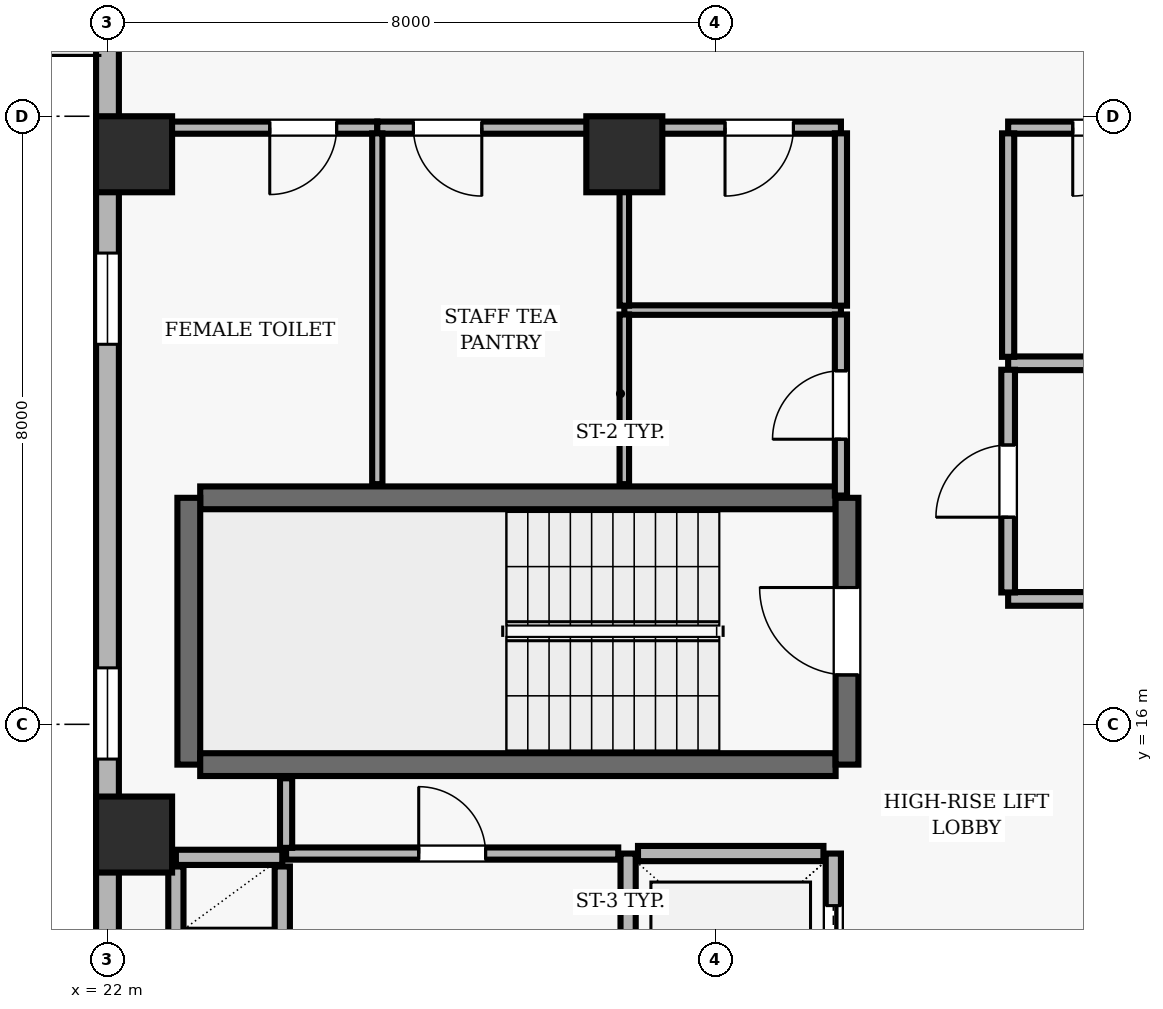
"""IFC4 building model, lengths in metres.
Left out: names, types, materials, properties, quantities, classifications, styles, units other than length and angle.
Written with IfcOpenShell. Run it as: python <this file> out.ifc"""

import sys

from ifc_helpers import new_model, si_unit, direction, frame, frame_2d, origin, origin_2d, place, context, subcontext, project, spatial, rectangle, extrude, element, fill, save


model = new_model("IFC4")
c1 = context("Model", 3, precision=1e-05, world=origin(), true_north=direction((0.0, 1.0)))
c2 = subcontext(c1, "Body", "Model", "MODEL_VIEW")
j1 = project(units=[si_unit("LENGTHUNIT", "METRE"), si_unit("PLANEANGLEUNIT", "RADIAN")], contexts=[c1])
p1 = place(None, origin())
s1 = spatial("IfcSite", under=j1, at=p1, CompositionType="ELEMENT")
p2 = place(p1, origin())
s2 = spatial("IfcBuilding", under=s1, at=p2, CompositionType="ELEMENT")
p3 = place(p2, frame((0.0, 0.0, 199.2)))
s3 = spatial("IfcBuildingStorey", under=s2, at=p3, CompositionType="ELEMENT", Elevation=199.2)
for number, where, z_axis, x_axis in (
    (1, (22.35, 14.55, 0.0), (0.0, 0.0, 1.0), (1.0, 0.0, 0.0)),
    (2, (22.35, 23.5, 0.0), (0.0, 0.0, 1.0), (1.0, 0.0, 0.0)),
    (3, (28.8, 23.5, 0.0), (0.0, 0.0, 1.0), (1.0, 0.0, 0.0)),
):
    element("IfcColumn", number, at=place(p3, frame(where, z_axis=z_axis, x_axis=x_axis)), inside=s3, PredefinedType="COLUMN", context=c2, shape_type="SweptSolid", body=[
        extrude(rectangle(XDim=1.0, YDim=1.0, at=origin_2d()), origin(), (0.0, 0.0, 1.0), 3.9),
    ])
p4 = place(p3, frame((22.0, 40.7, 0.0), z_axis=(0.0, 0.0, 1.0), x_axis=(0.0, -1.0, 0.0)))
e4 = element("IfcWall", 4, at=p4, inside=s3, PredefinedType="SOLIDWALL", context=c2, shape_type="SweptSolid", body=[
    extrude(rectangle(XDim=38.2, YDim=0.3, at=frame_2d((19.1, 0.0))), origin(), (0.0, 0.0, 1.0), 3.69),
])
p5 = place(p4, frame((7.8, 0.0, 0.0)))
e5 = element("IfcOpeningElement", 5, at=p5, cuts=e4, PredefinedType="OPENING", context=c2, shape_type="SweptSolid", body=[
    extrude(rectangle(XDim=1.0, YDim=2.2, at=frame_2d((0.5, 1.1))), frame((0.0, 0.16, 0.0), z_axis=(0.0, -1.0, 0.0), x_axis=(1.0, 0.0, 0.0)), (0.0, 0.0, 1.0), 0.32),
])
p6 = place(p4, frame((2.129, 0.0, 0.9)))
e6 = element("IfcOpeningElement", 6, at=p6, cuts=e4, PredefinedType="OPENING", context=c2, shape_type="SweptSolid", body=[
    extrude(rectangle(XDim=1.2, YDim=1.6, at=frame_2d((0.6, 0.8))), frame((0.0, 0.16, 0.0), z_axis=(0.0, -1.0, 0.0), x_axis=(1.0, 0.0, 0.0)), (0.0, 0.0, 1.0), 0.32),
])
p7 = place(p4, frame((12.593, 0.0, 0.9)))
e7 = element("IfcOpeningElement", 7, at=p7, cuts=e4, PredefinedType="OPENING", context=c2, shape_type="SweptSolid", body=[
    extrude(rectangle(XDim=1.2, YDim=1.6, at=frame_2d((0.6, 0.8))), frame((0.0, 0.16, 0.0), z_axis=(0.0, -1.0, 0.0), x_axis=(1.0, 0.0, 0.0)), (0.0, 0.0, 1.0), 0.32),
])
p8 = place(p4, frame((18.5, 0.0, 0.9)))
e8 = element("IfcOpeningElement", 8, at=p8, cuts=e4, PredefinedType="OPENING", context=c2, shape_type="SweptSolid", body=[
    extrude(rectangle(XDim=1.2, YDim=1.6, at=frame_2d((0.6, 0.8))), frame((0.0, 0.16, 0.0), z_axis=(0.0, -1.0, 0.0), x_axis=(1.0, 0.0, 0.0)), (0.0, 0.0, 1.0), 0.32),
])
p9 = place(p4, frame((23.957, 0.0, 0.9)))
e9 = element("IfcOpeningElement", 9, at=p9, cuts=e4, PredefinedType="OPENING", context=c2, shape_type="SweptSolid", body=[
    extrude(rectangle(XDim=1.2, YDim=1.6, at=frame_2d((0.6, 0.8))), frame((0.0, 0.16, 0.0), z_axis=(0.0, -1.0, 0.0), x_axis=(1.0, 0.0, 0.0)), (0.0, 0.0, 1.0), 0.32),
])
p10 = place(p4, frame((29.414, 0.0, 0.9)))
e10 = element("IfcOpeningElement", 10, at=p10, cuts=e4, PredefinedType="OPENING", context=c2, shape_type="SweptSolid", body=[
    extrude(rectangle(XDim=1.2, YDim=1.6, at=frame_2d((0.6, 0.8))), frame((0.0, 0.16, 0.0), z_axis=(0.0, -1.0, 0.0), x_axis=(1.0, 0.0, 0.0)), (0.0, 0.0, 1.0), 0.32),
])
p11 = place(p3, frame((31.58, 18.98, 0.0), z_axis=(0.0, 0.0, 1.0), x_axis=(-1.0, 0.0, 0.0)))
e11 = element("IfcWall", 11, at=p11, inside=s3, PredefinedType="SHEAR", context=c2, shape_type="SweptSolid", body=[
    extrude(rectangle(XDim=8.36, YDim=0.3, at=frame_2d((4.18, 0.0))), origin(), (0.0, 0.0, 1.0), 3.69),
])
p12 = place(p3, frame((23.07, 18.98, 0.0), z_axis=(0.0, 0.0, 1.0), x_axis=(0.0, -1.0, 0.0)))
e12 = element("IfcWall", 12, at=p12, inside=s3, PredefinedType="SHEAR", context=c2, shape_type="SweptSolid", body=[
    extrude(rectangle(XDim=3.51, YDim=0.3, at=frame_2d((1.755, 0.0))), origin(), (0.0, 0.0, 1.0), 3.69),
])
p13 = place(p3, frame((23.22, 15.47, 0.0), z_axis=(0.0, 0.0, 1.0), x_axis=(1.0, 0.0, 0.0)))
e13 = element("IfcWall", 13, at=p13, inside=s3, PredefinedType="SHEAR", context=c2, shape_type="SweptSolid", body=[
    extrude(rectangle(XDim=8.36, YDim=0.3, at=frame_2d((4.18, 0.0))), origin(), (0.0, 0.0, 1.0), 3.69),
])
p14 = place(p3, frame((31.73, 15.47, 0.0), z_axis=(0.0, 0.0, 1.0), x_axis=(0.0, 1.0, 0.0)))
e14 = element("IfcWall", 14, at=p14, inside=s3, PredefinedType="SHEAR", context=c2, shape_type="SweptSolid", body=[
    extrude(rectangle(XDim=3.51, YDim=0.3, at=frame_2d((1.755, 0.0))), origin(), (0.0, 0.0, 1.0), 3.69),
])
p15 = place(p14, frame((1.18, 0.0, 0.0)))
e15 = element("IfcOpeningElement", 15, at=p15, cuts=e14, PredefinedType="OPENING", context=c2, shape_type="SweptSolid", body=[
    extrude(rectangle(XDim=1.15, YDim=2.15, at=frame_2d((0.575, 1.075))), frame((0.0, 0.16, 0.0), z_axis=(0.0, -1.0, 0.0), x_axis=(1.0, 0.0, 0.0)), (0.0, 0.0, 1.0), 0.32),
])
p16 = place(p3, frame((28.85, 14.3, 0.0), z_axis=(0.0, 0.0, 1.0), x_axis=(0.0, -1.0, 0.0)))
e16 = element("IfcWall", 16, at=p16, inside=s3, PredefinedType="SOLIDWALL", context=c2, shape_type="SweptSolid", body=[
    extrude(rectangle(XDim=2.37, YDim=0.2, at=frame_2d((1.185, 0.0))), origin(), (0.0, 0.0, 1.0), 3.69),
])
p17 = place(p3, frame((31.55, 11.93, 0.0), z_axis=(0.0, 0.0, 1.0), x_axis=(0.0, 1.0, 0.0)))
e17 = element("IfcWall", 17, at=p17, inside=s3, PredefinedType="SOLIDWALL", context=c2, shape_type="SweptSolid", body=[
    extrude(rectangle(XDim=2.37, YDim=0.2, at=frame_2d((1.185, 0.0))), origin(), (0.0, 0.0, 1.0), 3.69),
])
p18 = place(p17, frame((0.685, 0.0, 0.0)))
e18 = element("IfcOpeningElement", 18, at=p18, cuts=e17, PredefinedType="OPENING", context=c2, shape_type="SweptSolid", body=[
    extrude(rectangle(XDim=1.0, YDim=2.1, at=frame_2d((0.5, 1.05))), frame((0.0, 0.11, 0.0), z_axis=(0.0, -1.0, 0.0), x_axis=(1.0, 0.0, 0.0)), (0.0, 0.0, 1.0), 0.22),
])
p19 = place(p3, frame((31.42, 14.3, 0.0), z_axis=(0.0, 0.0, 1.0), x_axis=(-1.0, 0.0, 0.0)))
e19 = element("IfcWall", 19, at=p19, inside=s3, PredefinedType="SOLIDWALL", context=c2, shape_type="SweptSolid", body=[
    extrude(rectangle(XDim=2.44, YDim=0.2, at=frame_2d((1.22, 0.0))), origin(), (0.0, 0.0, 1.0), 3.69),
])
p20 = place(p3, frame((22.9, 14.25, 0.0), z_axis=(0.0, 0.0, 1.0), x_axis=(1.0, 0.0, 0.0)))
e20 = element("IfcWall", 20, at=p20, inside=s3, PredefinedType="SOLIDWALL", context=c2, shape_type="SweptSolid", body=[
    extrude(rectangle(XDim=1.4, YDim=0.2, at=frame_2d((0.7, 0.0))), origin(), (0.0, 0.0, 1.0), 3.69),
])
for number, where, z_axis, x_axis in (
    (21, (24.3, 12.3, 0.0), (0.0, 0.0, 1.0), (0.0, 1.0, 0.0)),
    (22, (22.9, 12.3, 0.0), (0.0, 0.0, 1.0), (0.0, 1.0, 0.0)),
):
    element("IfcWall", number, at=place(p3, frame(where, z_axis=z_axis, x_axis=x_axis)), inside=s3, PredefinedType="SOLIDWALL", context=c2, shape_type="SweptSolid", body=[
        extrude(rectangle(XDim=1.83, YDim=0.2, at=frame_2d((0.915, 0.0))), origin(), (0.0, 0.0, 1.0), 3.69),
    ])
p21 = place(p3, frame((24.35, 14.3, 0.0), z_axis=(0.0, 0.0, 1.0), x_axis=(1.0, 0.0, 0.0)))
e23 = element("IfcWall", 23, at=p21, inside=s3, PredefinedType="PARTITIONING", context=c2, shape_type="SweptSolid", body=[
    extrude(rectangle(XDim=4.37, YDim=0.16, at=frame_2d((2.185, 0.0))), origin(), (0.0, 0.0, 1.0), 3.69),
])
p22 = place(p21, frame((1.745, 0.0, 0.0)))
e24 = element("IfcOpeningElement", 24, at=p22, cuts=e23, PredefinedType="OPENING", context=c2, shape_type="SweptSolid", body=[
    extrude(rectangle(XDim=0.88, YDim=2.1, at=frame_2d((0.44, 1.05))), frame((0.0, 0.09, 0.0), z_axis=(0.0, -1.0, 0.0), x_axis=(1.0, 0.0, 0.0)), (0.0, 0.0, 1.0), 0.18),
])
p23 = place(p3, frame((25.55, 23.85, 0.0), z_axis=(0.0, 0.0, 1.0), x_axis=(-1.0, 0.0, 0.0)))
e25 = element("IfcWall", 25, at=p23, inside=s3, PredefinedType="PARTITIONING", context=c2, shape_type="SweptSolid", body=[
    extrude(rectangle(XDim=3.35, YDim=0.16, at=frame_2d((1.675, 0.0))), origin(), (0.0, 0.0, 1.0), 3.139),
])
p24 = place(p23, frame((0.535, 0.0, 0.0)))
e26 = element("IfcOpeningElement", 26, at=p24, cuts=e25, PredefinedType="OPENING", context=c2, shape_type="SweptSolid", body=[
    extrude(rectangle(XDim=0.88, YDim=2.1, at=frame_2d((0.44, 1.05))), frame((0.0, 0.09, 0.0), z_axis=(0.0, -1.0, 0.0), x_axis=(1.0, 0.0, 0.0)), (0.0, 0.0, 1.0), 0.18),
])
p25 = place(p3, frame((28.8, 23.85, 0.0), z_axis=(0.0, 0.0, 1.0), x_axis=(-1.0, 0.0, 0.0)))
e27 = element("IfcWall", 27, at=p25, inside=s3, PredefinedType="PARTITIONING", context=c2, shape_type="SweptSolid", body=[
    extrude(rectangle(XDim=3.25, YDim=0.16, at=frame_2d((1.625, 0.0))), origin(), (0.0, 0.0, 1.0), 3.139),
])
p26 = place(p25, frame((1.875, 0.0, 0.0)))
e28 = element("IfcOpeningElement", 28, at=p26, cuts=e27, PredefinedType="OPENING", context=c2, shape_type="SweptSolid", body=[
    extrude(rectangle(XDim=0.9, YDim=2.1, at=frame_2d((0.45, 1.05))), frame((0.0, 0.09, 0.0), z_axis=(0.0, -1.0, 0.0), x_axis=(1.0, 0.0, 0.0)), (0.0, 0.0, 1.0), 0.18),
])
p27 = place(p3, frame((31.65, 21.45, 0.0), z_axis=(0.0, 0.0, 1.0), x_axis=(-1.0, 0.0, 0.0)))
e29 = element("IfcWall", 29, at=p27, inside=s3, PredefinedType="PARTITIONING", context=c2, shape_type="SweptSolid", body=[
    extrude(rectangle(XDim=2.85, YDim=0.125, at=frame_2d((1.425, 0.0))), origin(), (0.0, 0.0, 1.0), 3.69),
])
p28 = place(p3, frame((31.65, 23.85, 0.0), z_axis=(0.0, 0.0, 1.0), x_axis=(-1.0, 0.0, 0.0)))
e30 = element("IfcWall", 30, at=p28, inside=s3, PredefinedType="PARTITIONING", context=c2, shape_type="SweptSolid", body=[
    extrude(rectangle(XDim=2.85, YDim=0.16, at=frame_2d((1.425, 0.0))), origin(), (0.0, 0.0, 1.0), 3.139),
])
p29 = place(p28, frame((0.625, 0.0, 0.0)))
e31 = element("IfcOpeningElement", 31, at=p29, cuts=e30, PredefinedType="OPENING", context=c2, shape_type="SweptSolid", body=[
    extrude(rectangle(XDim=0.9, YDim=2.1, at=frame_2d((0.45, 1.05))), frame((0.0, 0.09, 0.0), z_axis=(0.0, -1.0, 0.0), x_axis=(1.0, 0.0, 0.0)), (0.0, 0.0, 1.0), 0.18),
])
p30 = place(p3, frame((33.85, 17.65, 0.0), z_axis=(0.0, 0.0, 1.0), x_axis=(1.0, 0.0, 0.0)))
e32 = element("IfcWall", 32, at=p30, inside=s3, PredefinedType="PARTITIONING", context=c2, shape_type="SweptSolid", body=[
    extrude(rectangle(XDim=1.3, YDim=0.18, at=frame_2d((0.65, 0.0))), origin(), (0.0, 0.0, 1.0), 3.69),
])
p31 = place(p3, frame((37.85, 20.75, 0.0), z_axis=(0.0, 0.0, 1.0), x_axis=(-1.0, 0.0, 0.0)))
e33 = element("IfcWall", 33, at=p31, inside=s3, PredefinedType="PARTITIONING", context=c2, shape_type="SweptSolid", body=[
    extrude(rectangle(XDim=4.0, YDim=0.18, at=frame_2d((2.0, 0.0))), origin(), (0.0, 0.0, 1.0), 3.69),
])
p32 = place(p3, frame((37.85, 23.85, 0.0), z_axis=(0.0, 0.0, 1.0), x_axis=(-1.0, 0.0, 0.0)))
e34 = element("IfcWall", 34, at=p32, inside=s3, PredefinedType="PARTITIONING", context=c2, shape_type="SweptSolid", body=[
    extrude(rectangle(XDim=4.0, YDim=0.16, at=frame_2d((2.0, 0.0))), origin(), (0.0, 0.0, 1.0), 3.139),
])
p33 = place(p32, frame((2.25, 0.0, 0.0)))
e35 = element("IfcOpeningElement", 35, at=p33, cuts=e34, PredefinedType="OPENING", context=c2, shape_type="SweptSolid", body=[
    extrude(rectangle(XDim=0.9, YDim=2.1, at=frame_2d((0.45, 1.05))), frame((0.0, 0.09, 0.0), z_axis=(0.0, -1.0, 0.0), x_axis=(1.0, 0.0, 0.0)), (0.0, 0.0, 1.0), 0.18),
])
p34 = place(p3, frame((24.35, 15.29, 0.0), z_axis=(0.0, 0.0, 1.0), x_axis=(0.0, -1.0, 0.0)))
e36 = element("IfcWall", 36, at=p34, inside=s3, PredefinedType="PARTITIONING", context=c2, shape_type="SweptSolid", body=[
    extrude(rectangle(XDim=0.915, YDim=0.16, at=frame_2d((0.458, 0.0))), origin(), (0.0, 0.0, 1.0), 3.69),
])
p35 = place(p3, frame((25.55, 19.16, 0.0), z_axis=(0.0, 0.0, 1.0), x_axis=(0.0, 1.0, 0.0)))
e37 = element("IfcWall", 37, at=p35, inside=s3, PredefinedType="PARTITIONING", context=c2, shape_type="SweptSolid", body=[
    extrude(rectangle(XDim=4.615, YDim=0.135, at=frame_2d((2.308, 0.0))), origin(), (0.0, 0.0, 1.0), 3.69),
])
p36 = place(p3, frame((28.8, 21.392, 0.0), z_axis=(0.0, 0.0, 1.0), x_axis=(0.0, -1.0, 0.0)))
e38 = element("IfcWall", 38, at=p36, inside=s3, PredefinedType="PARTITIONING", context=c2, shape_type="SweptSolid", body=[
    extrude(rectangle(XDim=2.232, YDim=0.125, at=frame_2d((1.116, 0.0))), origin(), (0.0, 0.0, 1.0), 3.69),
])
p37 = place(p3, frame((28.8, 23.775, 0.0), z_axis=(0.0, 0.0, 1.0), x_axis=(0.0, -1.0, 0.0)))
e39 = element("IfcWall", 39, at=p37, inside=s3, PredefinedType="PARTITIONING", context=c2, shape_type="SweptSolid", body=[
    extrude(rectangle(XDim=2.267, YDim=0.125, at=frame_2d((1.133, 0.0))), origin(), (0.0, 0.0, 1.0), 3.69),
])
p38 = place(p3, frame((31.65, 19.01, 0.0), z_axis=(0.0, 0.0, 1.0), x_axis=(0.0, 1.0, 0.0)))
e40 = element("IfcWall", 40, at=p38, inside=s3, PredefinedType="PARTITIONING", context=c2, shape_type="SweptSolid", body=[
    extrude(rectangle(XDim=2.382, YDim=0.16, at=frame_2d((1.191, 0.0))), origin(), (0.0, 0.0, 1.0), 3.69),
])
p39 = place(p38, frame((0.741, 0.0, 0.0)))
e41 = element("IfcOpeningElement", 41, at=p39, cuts=e40, PredefinedType="OPENING", context=c2, shape_type="SweptSolid", body=[
    extrude(rectangle(XDim=0.9, YDim=2.1, at=frame_2d((0.45, 1.05))), frame((0.0, 0.09, 0.0), z_axis=(0.0, -1.0, 0.0), x_axis=(1.0, 0.0, 0.0)), (0.0, 0.0, 1.0), 0.18),
])
p40 = place(p3, frame((31.65, 23.775, 0.0), z_axis=(0.0, 0.0, 1.0), x_axis=(0.0, -1.0, 0.0)))
e42 = element("IfcWall", 42, at=p40, inside=s3, PredefinedType="PARTITIONING", context=c2, shape_type="SweptSolid", body=[
    extrude(rectangle(XDim=2.267, YDim=0.16, at=frame_2d((1.133, 0.0))), origin(), (0.0, 0.0, 1.0), 3.69),
])
p41 = place(p3, frame((33.85, 17.735, 0.0), z_axis=(0.0, 0.0, 1.0), x_axis=(0.0, 1.0, 0.0)))
e43 = element("IfcWall", 43, at=p41, inside=s3, PredefinedType="PARTITIONING", context=c2, shape_type="SweptSolid", body=[
    extrude(rectangle(XDim=2.93, YDim=0.18, at=frame_2d((1.465, 0.0))), origin(), (0.0, 0.0, 1.0), 3.69),
])
p42 = place(p41, frame((0.99, 0.0, 0.0)))
e44 = element("IfcOpeningElement", 44, at=p42, cuts=e43, PredefinedType="OPENING", context=c2, shape_type="SweptSolid", body=[
    extrude(rectangle(XDim=0.95, YDim=2.1, at=frame_2d((0.475, 1.05))), frame((0.0, 0.1, 0.0), z_axis=(0.0, -1.0, 0.0), x_axis=(1.0, 0.0, 0.0)), (0.0, 0.0, 1.0), 0.2),
])
p43 = place(p3, frame((33.85, 20.835, 0.0), z_axis=(0.0, 0.0, 1.0), x_axis=(0.0, 1.0, 0.0)))
e45 = element("IfcWall", 45, at=p43, inside=s3, PredefinedType="PARTITIONING", context=c2, shape_type="SweptSolid", body=[
    extrude(rectangle(XDim=2.94, YDim=0.16, at=frame_2d((1.47, 0.0))), origin(), (0.0, 0.0, 1.0), 3.69),
])
p44 = place(p8, origin())
e46 = element("IfcWindow", 46, at=p44, inside=s3, PartitioningType="SINGLE_PANEL", PredefinedType="WINDOW", context=c2, shape_type="SweptSolid", body=[
    extrude(rectangle(XDim=1.2, YDim=1.6, at=frame_2d((0.6, 0.8))), frame((0.0, 0.03, 0.0), z_axis=(0.0, -1.0, 0.0), x_axis=(1.0, 0.0, 0.0)), (0.0, 0.0, 1.0), 0.06),
])
fill(e8, e46)
p45 = place(p9, origin())
e47 = element("IfcWindow", 47, at=p45, inside=s3, PartitioningType="SINGLE_PANEL", PredefinedType="WINDOW", context=c2, shape_type="SweptSolid", body=[
    extrude(rectangle(XDim=1.2, YDim=1.6, at=frame_2d((0.6, 0.8))), frame((0.0, 0.03, 0.0), z_axis=(0.0, -1.0, 0.0), x_axis=(1.0, 0.0, 0.0)), (0.0, 0.0, 1.0), 0.06),
])
fill(e9, e47)
p46 = place(p15, origin())
e48 = element("IfcDoor", 48, at=p46, inside=s3, OperationType="SINGLE_SWING_RIGHT", PredefinedType="DOOR", context=c2, shape_type="SweptSolid", body=[
    extrude(rectangle(XDim=1.15, YDim=2.15, at=frame_2d((0.575, 1.075))), frame((0.0, 0.025, 0.0), z_axis=(0.0, -1.0, 0.0), x_axis=(1.0, 0.0, 0.0)), (0.0, 0.0, 1.0), 0.05),
])
fill(e15, e48)
p47 = place(p18, origin())
e49 = element("IfcDoor", 49, at=p47, inside=s3, OperationType="DOUBLE_DOOR_SLIDING", PredefinedType="DOOR", context=c2, shape_type="SweptSolid", body=[
    extrude(rectangle(XDim=1.0, YDim=2.1, at=frame_2d((0.5, 1.05))), frame((0.0, 0.025, 0.0), z_axis=(0.0, -1.0, 0.0), x_axis=(1.0, 0.0, 0.0)), (0.0, 0.0, 1.0), 0.05),
])
fill(e18, e49)
p48 = place(p42, origin())
e50 = element("IfcDoor", 50, at=p48, inside=s3, OperationType="SINGLE_SWING_LEFT", PredefinedType="DOOR", context=c2, shape_type="SweptSolid", body=[
    extrude(rectangle(XDim=0.95, YDim=2.1, at=frame_2d((0.475, 1.05))), frame((0.0, 0.025, 0.0), z_axis=(0.0, -1.0, 0.0), x_axis=(1.0, 0.0, 0.0)), (0.0, 0.0, 1.0), 0.05),
])
fill(e44, e50)
p49 = place(p33, origin())
e51 = element("IfcDoor", 51, at=p49, inside=s3, OperationType="SINGLE_SWING_RIGHT", PredefinedType="DOOR", context=c2, shape_type="SweptSolid", body=[
    extrude(rectangle(XDim=0.9, YDim=2.1, at=frame_2d((0.45, 1.05))), frame((0.0, 0.025, 0.0), z_axis=(0.0, -1.0, 0.0), x_axis=(1.0, 0.0, 0.0)), (0.0, 0.0, 1.0), 0.05),
])
fill(e35, e51)
p50 = place(p39, origin())
e52 = element("IfcDoor", 52, at=p50, inside=s3, OperationType="SINGLE_SWING_LEFT", PredefinedType="DOOR", context=c2, shape_type="SweptSolid", body=[
    extrude(rectangle(XDim=0.9, YDim=2.1, at=frame_2d((0.45, 1.05))), frame((0.0, 0.025, 0.0), z_axis=(0.0, -1.0, 0.0), x_axis=(1.0, 0.0, 0.0)), (0.0, 0.0, 1.0), 0.05),
])
fill(e41, e52)
p51 = place(p29, origin())
e53 = element("IfcDoor", 53, at=p51, inside=s3, OperationType="SINGLE_SWING_RIGHT", PredefinedType="DOOR", context=c2, shape_type="SweptSolid", body=[
    extrude(rectangle(XDim=0.9, YDim=2.1, at=frame_2d((0.45, 1.05))), frame((0.0, 0.025, 0.0), z_axis=(0.0, -1.0, 0.0), x_axis=(1.0, 0.0, 0.0)), (0.0, 0.0, 1.0), 0.05),
])
fill(e31, e53)
p52 = place(p22, origin())
e54 = element("IfcDoor", 54, at=p52, inside=s3, OperationType="SINGLE_SWING_LEFT", PredefinedType="DOOR", context=c2, shape_type="SweptSolid", body=[
    extrude(rectangle(XDim=0.88, YDim=2.1, at=frame_2d((0.44, 1.05))), frame((0.0, 0.025, 0.0), z_axis=(0.0, -1.0, 0.0), x_axis=(1.0, 0.0, 0.0)), (0.0, 0.0, 1.0), 0.05),
])
fill(e24, e54)
p53 = place(p24, origin())
e55 = element("IfcDoor", 55, at=p53, inside=s3, OperationType="SINGLE_SWING_RIGHT", PredefinedType="DOOR", context=c2, shape_type="SweptSolid", body=[
    extrude(rectangle(XDim=0.88, YDim=2.1, at=frame_2d((0.44, 1.05))), frame((0.0, 0.025, 0.0), z_axis=(0.0, -1.0, 0.0), x_axis=(1.0, 0.0, 0.0)), (0.0, 0.0, 1.0), 0.05),
])
fill(e26, e55)
p54 = place(p26, origin())
e56 = element("IfcDoor", 56, at=p54, inside=s3, OperationType="SINGLE_SWING_LEFT", PredefinedType="DOOR", context=c2, shape_type="SweptSolid", body=[
    extrude(rectangle(XDim=0.9, YDim=2.1, at=frame_2d((0.45, 1.05))), frame((0.0, 0.025, 0.0), z_axis=(0.0, -1.0, 0.0), x_axis=(1.0, 0.0, 0.0)), (0.0, 0.0, 1.0), 0.05),
])
fill(e28, e56)
save(model, sys.argv[1])
